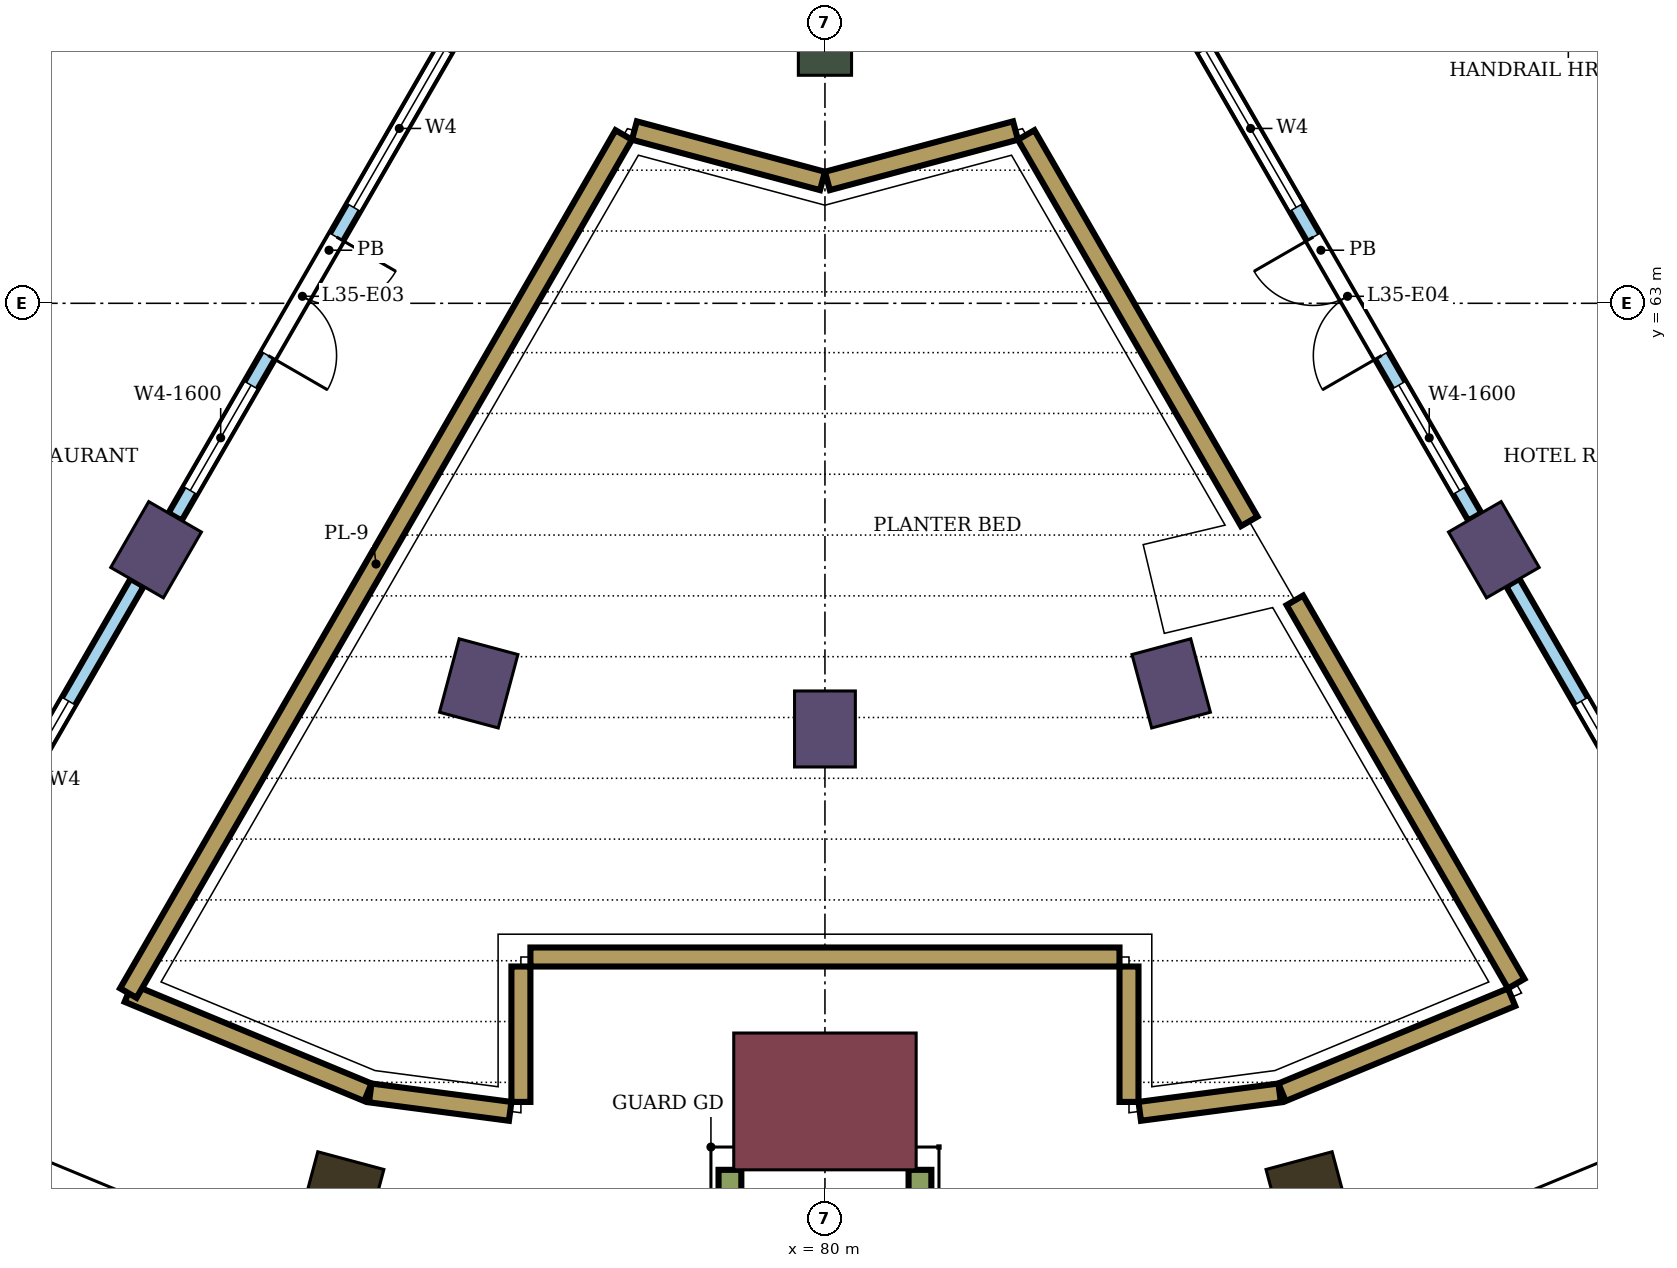
"""IFC4 building model, lengths in metres.
Left out: names, types, materials, properties, quantities, classifications, styles, units other than length and angle.
Written with IfcOpenShell. Run it as: python <this file> out.ifc"""

import sys

from ifc_helpers import new_model, si_unit, direction, frame, frame_2d, origin, origin_2d, place, context, subcontext, project, spatial, rectangle, extrude, element, fill, save


model = new_model("IFC4")
c1 = context("Model", 3, precision=1e-05, world=origin(), true_north=direction((0.0, 1.0)))
c2 = subcontext(c1, "Body", "Model", "MODEL_VIEW")
j1 = project(units=[si_unit("LENGTHUNIT", "METRE"), si_unit("PLANEANGLEUNIT", "RADIAN")], contexts=[c1])
p1 = place(None, origin())
s1 = spatial("IfcSite", under=j1, at=p1, CompositionType="ELEMENT")
p2 = place(p1, origin())
s2 = spatial("IfcBuilding", under=s1, at=p2, CompositionType="ELEMENT")
p3 = place(p2, frame((0.0, 0.0, 149.7)))
s3 = spatial("IfcBuildingStorey", under=s2, at=p3, CompositionType="ELEMENT", Elevation=149.7)
for number, where, z_axis, x_axis in (
    (1, (73.633, 51.238, 0.0), (0.0, 0.0, 1.0), (-0.259, -0.966, 0.0)),
    (2, (86.367, 51.238, 0.0), (0.0, 0.0, 1.0), (0.259, -0.966, 0.0)),
):
    element("IfcColumn", number, at=place(p3, frame(where, z_axis=z_axis, x_axis=x_axis)), inside=s3, PredefinedType="COLUMN", context=c2, shape_type="SweptSolid", body=[
        extrude(rectangle(XDim=1.0, YDim=0.9, at=origin_2d()), origin(), (0.0, 0.0, 1.0), 8.0),
    ])
for number, where, z_axis, x_axis in (
    (3, (71.2, 59.758, 0.0), (0.0, 0.0, 1.0), (-0.5, -0.866, 0.0)),
    (4, (75.445, 58.0, 0.0), (0.0, 0.0, 1.0), (-0.259, -0.966, 0.0)),
    (5, (80.0, 57.4, 0.0), (0.0, 0.0, 1.0), (0.0, -1.0, 0.0)),
    (6, (84.555, 58.0, 0.0), (0.0, 0.0, 1.0), (0.259, -0.966, 0.0)),
    (7, (88.8, 59.758, 0.0), (0.0, 0.0, 1.0), (0.5, -0.866, 0.0)),
):
    element("IfcColumn", number, at=place(p3, frame(where, z_axis=z_axis, x_axis=x_axis)), inside=s3, PredefinedType="COLUMN", context=c2, shape_type="SweptSolid", body=[
        extrude(rectangle(XDim=1.0, YDim=0.8, at=origin_2d()), origin(), (0.0, 0.0, 1.0), 8.0),
    ])
p4 = place(p3, frame((80.0, 66.4, 0.0), z_axis=(0.0, 0.0, 1.0), x_axis=(0.0, -1.0, 0.0)))
e8 = element("IfcColumn", 8, at=p4, inside=s3, PredefinedType="COLUMN", context=c2, shape_type="SweptSolid", body=[
    extrude(rectangle(XDim=0.8, YDim=0.7, at=origin_2d()), origin(), (0.0, 0.0, 1.0), 8.0),
])
p5 = place(p3, frame((80.0, 52.5, 0.0), z_axis=(0.0, 0.0, 1.0), x_axis=(0.0, -1.0, 0.0)))
e9 = element("IfcColumn", 9, at=p5, inside=s3, PredefinedType="COLUMN", context=c2, shape_type="SweptSolid", body=[
    extrude(rectangle(XDim=1.8, YDim=2.4, at=origin_2d()), origin(), (0.0, 0.0, 1.0), 8.0),
])
for number, where, z_axis, x_axis in (
    (10, (78.75, 51.6, 0.0), (0.0, 0.0, 1.0), (0.0, -1.0, 0.0)),
    (11, (81.25, 51.6, 0.0), (0.0, 0.0, 1.0), (0.0, -1.0, 0.0)),
):
    element("IfcWall", number, at=place(p3, frame(where, z_axis=z_axis, x_axis=x_axis)), inside=s3, PredefinedType="NOTDEFINED", context=c2, shape_type="SweptSolid", body=[
        extrude(rectangle(XDim=2.416, YDim=0.3, at=frame_2d((1.208, 0.0))), origin(), (0.0, 0.0, 1.0), 8.0),
    ])
p6 = place(p3, frame((70.835, 53.926, 0.0), z_axis=(0.0, 0.0, 1.0), x_axis=(0.923871147788, -0.38270367425, 0.0)))
e12 = element("IfcWall", 12, at=p6, inside=s3, PredefinedType="USERDEFINED", context=c2, shape_type="SweptSolid", body=[
    extrude(rectangle(XDim=3.411, YDim=0.25, at=frame_2d((1.706, 0.0))), origin(), (0.0, 0.0, 1.0), 0.6),
])
p7 = place(p3, frame((74.018, 52.612, 0.0), z_axis=(0.0, 0.0, 1.0), x_axis=(0.991436829887, -0.130587182926, 0.0)))
e13 = element("IfcWall", 13, at=p7, inside=s3, PredefinedType="USERDEFINED", context=c2, shape_type="SweptSolid", body=[
    extrude(rectangle(XDim=1.856, YDim=0.25, at=frame_2d((0.928, 0.0))), origin(), (0.0, 0.0, 1.0), 0.6),
])
p8 = place(p3, frame((76.0, 52.493, 0.0), z_axis=(0.0, 0.0, 1.0), x_axis=(0.0, 1.0, 0.0)))
e14 = element("IfcWall", 14, at=p8, inside=s3, PredefinedType="USERDEFINED", context=c2, shape_type="SweptSolid", body=[
    extrude(rectangle(XDim=1.781, YDim=0.25, at=frame_2d((0.891, 0.0))), origin(), (0.0, 0.0, 1.0), 0.6),
])
p9 = place(p3, frame((76.125, 54.4, 0.0), z_axis=(0.0, 0.0, 1.0), x_axis=(1.0, 0.0, 0.0)))
e15 = element("IfcWall", 15, at=p9, inside=s3, PredefinedType="USERDEFINED", context=c2, shape_type="SweptSolid", body=[
    extrude(rectangle(XDim=7.75, YDim=0.25, at=frame_2d((3.875, 0.0))), origin(), (0.0, 0.0, 1.0), 0.6),
])
p10 = place(p3, frame((84.0, 54.275, 0.0), z_axis=(0.0, 0.0, 1.0), x_axis=(0.0, -1.0, 0.0)))
e16 = element("IfcWall", 16, at=p10, inside=s3, PredefinedType="USERDEFINED", context=c2, shape_type="SweptSolid", body=[
    extrude(rectangle(XDim=1.781, YDim=0.25, at=frame_2d((0.891, 0.0))), origin(), (0.0, 0.0, 1.0), 0.6),
])
p11 = place(p3, frame((84.141, 52.369, 0.0), z_axis=(0.0, 0.0, 1.0), x_axis=(0.991436829887, 0.130587182926, 0.0)))
e17 = element("IfcWall", 17, at=p11, inside=s3, PredefinedType="USERDEFINED", context=c2, shape_type="SweptSolid", body=[
    extrude(rectangle(XDim=1.856, YDim=0.25, at=frame_2d((0.928, 0.0))), origin(), (0.0, 0.0, 1.0), 0.6),
])
p12 = place(p3, frame((86.014, 52.62, 0.0), z_axis=(0.0, 0.0, 1.0), x_axis=(0.923863886655, 0.382721202621, 0.0)))
e18 = element("IfcWall", 18, at=p12, inside=s3, PredefinedType="USERDEFINED", context=c2, shape_type="SweptSolid", body=[
    extrude(rectangle(XDim=3.269, YDim=0.25, at=frame_2d((1.634, 0.0))), origin(), (0.0, 0.0, 1.0), 0.6),
])
p13 = place(p3, frame((89.094, 54.049, 0.0), z_axis=(0.0, 0.0, 1.0), x_axis=(-0.50000795037, 0.866020813587, 0.0)))
e19 = element("IfcWall", 19, at=p13, inside=s3, PredefinedType="USERDEFINED", context=c2, shape_type="SweptSolid", body=[
    extrude(rectangle(XDim=5.823, YDim=0.25, at=frame_2d((2.912, 0.0))), origin(), (0.0, 0.0, 1.0), 0.6),
])
p14 = place(p3, frame((85.582, 60.131, 0.0), z_axis=(0.0, 0.0, 1.0), x_axis=(-0.499999689456, 0.866025583077, 0.0)))
e20 = element("IfcWall", 20, at=p14, inside=s3, PredefinedType="USERDEFINED", context=c2, shape_type="SweptSolid", body=[
    extrude(rectangle(XDim=5.87, YDim=0.25, at=frame_2d((2.935, 0.0))), origin(), (0.0, 0.0, 1.0), 0.6),
])
for number, where, z_axis, x_axis in (
    (21, (82.507, 65.273, 0.0), (0.0, 0.0, 1.0), (-0.966, -0.259, 0.0)),
    (22, (79.968, 64.61, 0.0), (0.0, 0.0, 1.0), (-0.966, 0.259, 0.0)),
):
    element("IfcWall", number, at=place(p3, frame(where, z_axis=z_axis, x_axis=x_axis)), inside=s3, PredefinedType="USERDEFINED", context=c2, shape_type="SweptSolid", body=[
        extrude(rectangle(XDim=2.562, YDim=0.25, at=frame_2d((1.281, 0.0))), origin(), (0.0, 0.0, 1.0), 0.6),
    ])
p15 = place(p3, frame((77.353, 65.215, 0.0), z_axis=(0.0, 0.0, 1.0), x_axis=(-0.499990498062, -0.866030889661, 0.0)))
e23 = element("IfcWall", 23, at=p15, inside=s3, PredefinedType="USERDEFINED", context=c2, shape_type="SweptSolid", body=[
    extrude(rectangle(XDim=13.035, YDim=0.25, at=frame_2d((6.518, 0.0))), origin(), (0.0, 0.0, 1.0), 0.6),
])
p16 = place(p3, frame((75.5, 67.206, 0.0), z_axis=(0.0, 0.0, 1.0), x_axis=(-0.499999880539, -0.866025472755, 0.0)))
e24 = element("IfcWall", 24, at=p16, inside=s3, PredefinedType="NOTDEFINED", context=c2, shape_type="SweptSolid", body=[
    extrude(rectangle(XDim=8.1, YDim=0.2, at=frame_2d((4.05, 0.0))), origin(), (0.0, 0.0, 1.0), 8.0),
])
p17 = place(p16, frame((1.0, 0.0, 0.3)))
e25 = element("IfcOpeningElement", 25, at=p17, cuts=e24, PredefinedType="OPENING", context=c2, shape_type="SweptSolid", body=[
    extrude(rectangle(XDim=2.4, YDim=3.6, at=frame_2d((1.2, 1.8))), frame((0.0, 0.11, 0.0), z_axis=(0.0, -1.0, 0.0), x_axis=(1.0, 0.0, 0.0)), (0.0, 0.0, 1.0), 0.22),
])
p18 = place(p16, frame((3.85, 0.0, 0.0)))
e26 = element("IfcOpeningElement", 26, at=p18, cuts=e24, PredefinedType="OPENING", context=c2, shape_type="SweptSolid", body=[
    extrude(rectangle(XDim=1.8, YDim=2.4, at=frame_2d((0.9, 1.2))), frame((0.0, 0.11, 0.0), z_axis=(0.0, -1.0, 0.0), x_axis=(1.0, 0.0, 0.0)), (0.0, 0.0, 1.0), 0.22),
])
p19 = place(p16, frame((6.1, 0.0, 0.3)))
e27 = element("IfcOpeningElement", 27, at=p19, cuts=e24, PredefinedType="OPENING", context=c2, shape_type="SweptSolid", body=[
    extrude(rectangle(XDim=1.6, YDim=3.6, at=frame_2d((0.8, 1.8))), frame((0.0, 0.11, 0.0), z_axis=(0.0, -1.0, 0.0), x_axis=(1.0, 0.0, 0.0)), (0.0, 0.0, 1.0), 0.22),
])
p20 = place(p3, frame((70.95, 59.325, 0.0), z_axis=(0.0, 0.0, 1.0), x_axis=(-0.500007758305, -0.866020924479, 0.0)))
e28 = element("IfcWall", 28, at=p20, inside=s3, PredefinedType="NOTDEFINED", context=c2, shape_type="SweptSolid", body=[
    extrude(rectangle(XDim=6.0, YDim=0.2, at=frame_2d((3.0, 0.0))), origin(), (0.0, 0.0, 1.0), 8.0),
])
p21 = place(p20, frame((1.8, 0.0, 0.3)))
e29 = element("IfcOpeningElement", 29, at=p21, cuts=e28, PredefinedType="OPENING", context=c2, shape_type="SweptSolid", body=[
    extrude(rectangle(XDim=2.4, YDim=3.6, at=frame_2d((1.2, 1.8))), frame((0.0, 0.11, 0.0), z_axis=(0.0, -1.0, 0.0), x_axis=(1.0, 0.0, 0.0)), (0.0, 0.0, 1.0), 0.22),
])
p22 = place(p3, frame((84.5, 67.206, 0.0), z_axis=(0.0, 0.0, 1.0), x_axis=(0.499999880539, -0.866025472755, 0.0)))
e30 = element("IfcWall", 30, at=p22, inside=s3, PredefinedType="NOTDEFINED", context=c2, shape_type="SweptSolid", body=[
    extrude(rectangle(XDim=8.1, YDim=0.2, at=frame_2d((4.05, 0.0))), origin(), (0.0, 0.0, 1.0), 8.0),
])
p23 = place(p22, frame((1.0, 0.0, 0.3)))
e31 = element("IfcOpeningElement", 31, at=p23, cuts=e30, PredefinedType="OPENING", context=c2, shape_type="SweptSolid", body=[
    extrude(rectangle(XDim=2.4, YDim=3.6, at=frame_2d((1.2, 1.8))), frame((0.0, 0.11, 0.0), z_axis=(0.0, -1.0, 0.0), x_axis=(1.0, 0.0, 0.0)), (0.0, 0.0, 1.0), 0.22),
])
p24 = place(p22, frame((3.85, 0.0, 0.0)))
e32 = element("IfcOpeningElement", 32, at=p24, cuts=e30, PredefinedType="OPENING", context=c2, shape_type="SweptSolid", body=[
    extrude(rectangle(XDim=1.8, YDim=2.4, at=frame_2d((0.9, 1.2))), frame((0.0, 0.11, 0.0), z_axis=(0.0, -1.0, 0.0), x_axis=(1.0, 0.0, 0.0)), (0.0, 0.0, 1.0), 0.22),
])
p25 = place(p22, frame((6.1, 0.0, 0.3)))
e33 = element("IfcOpeningElement", 33, at=p25, cuts=e30, PredefinedType="OPENING", context=c2, shape_type="SweptSolid", body=[
    extrude(rectangle(XDim=1.6, YDim=3.6, at=frame_2d((0.8, 1.8))), frame((0.0, 0.11, 0.0), z_axis=(0.0, -1.0, 0.0), x_axis=(1.0, 0.0, 0.0)), (0.0, 0.0, 1.0), 0.22),
])
p26 = place(p3, frame((89.05, 59.325, 0.0), z_axis=(0.0, 0.0, 1.0), x_axis=(0.500007758305, -0.866020924479, 0.0)))
e34 = element("IfcWall", 34, at=p26, inside=s3, PredefinedType="NOTDEFINED", context=c2, shape_type="SweptSolid", body=[
    extrude(rectangle(XDim=6.0, YDim=0.2, at=frame_2d((3.0, 0.0))), origin(), (0.0, 0.0, 1.0), 8.0),
])
p27 = place(p26, frame((1.8, 0.0, 0.3)))
e35 = element("IfcOpeningElement", 35, at=p27, cuts=e34, PredefinedType="OPENING", context=c2, shape_type="SweptSolid", body=[
    extrude(rectangle(XDim=2.4, YDim=3.6, at=frame_2d((1.2, 1.8))), frame((0.0, 0.11, 0.0), z_axis=(0.0, -1.0, 0.0), x_axis=(1.0, 0.0, 0.0)), (0.0, 0.0, 1.0), 0.22),
])
p28 = place(p17, origin())
e36 = element("IfcWindow", 36, at=p28, inside=s3, PartitioningType="SINGLE_PANEL", PredefinedType="WINDOW", context=c2, shape_type="SweptSolid", body=[
    extrude(rectangle(XDim=2.4, YDim=3.6, at=frame_2d((1.2, 1.8))), frame((0.0, 0.03, 0.0), z_axis=(0.0, -1.0, 0.0), x_axis=(1.0, 0.0, 0.0)), (0.0, 0.0, 1.0), 0.06),
])
fill(e25, e36)
p29 = place(p18, origin())
e37 = element("IfcDoor", 37, at=p29, inside=s3, OperationType="DOUBLE_DOOR_SINGLE_SWING", PredefinedType="DOOR", context=c2, shape_type="SweptSolid", body=[
    extrude(rectangle(XDim=1.8, YDim=2.4, at=frame_2d((0.9, 1.2))), frame((0.0, 0.025, 0.0), z_axis=(0.0, -1.0, 0.0), x_axis=(1.0, 0.0, 0.0)), (0.0, 0.0, 1.0), 0.05),
])
fill(e26, e37)
p30 = place(p19, origin())
e38 = element("IfcWindow", 38, at=p30, inside=s3, PartitioningType="SINGLE_PANEL", PredefinedType="WINDOW", context=c2, shape_type="SweptSolid", body=[
    extrude(rectangle(XDim=1.6, YDim=3.6, at=frame_2d((0.8, 1.8))), frame((0.0, 0.03, 0.0), z_axis=(0.0, -1.0, 0.0), x_axis=(1.0, 0.0, 0.0)), (0.0, 0.0, 1.0), 0.06),
])
fill(e27, e38)
p31 = place(p21, origin())
e39 = element("IfcWindow", 39, at=p31, inside=s3, PartitioningType="SINGLE_PANEL", PredefinedType="WINDOW", context=c2, shape_type="SweptSolid", body=[
    extrude(rectangle(XDim=2.4, YDim=3.6, at=frame_2d((1.2, 1.8))), frame((0.0, 0.03, 0.0), z_axis=(0.0, -1.0, 0.0), x_axis=(1.0, 0.0, 0.0)), (0.0, 0.0, 1.0), 0.06),
])
fill(e29, e39)
p32 = place(p23, origin())
e40 = element("IfcWindow", 40, at=p32, inside=s3, PartitioningType="SINGLE_PANEL", PredefinedType="WINDOW", context=c2, shape_type="SweptSolid", body=[
    extrude(rectangle(XDim=2.4, YDim=3.6, at=frame_2d((1.2, 1.8))), frame((0.0, 0.03, 0.0), z_axis=(0.0, -1.0, 0.0), x_axis=(1.0, 0.0, 0.0)), (0.0, 0.0, 1.0), 0.06),
])
fill(e31, e40)
p33 = place(p24, frame((1.8, 0.0, 0.0), z_axis=(0.0, 0.0, 1.0), x_axis=(-1.0, 0.0, 0.0)))
e41 = element("IfcDoor", 41, at=p33, inside=s3, OperationType="DOUBLE_DOOR_SINGLE_SWING", PredefinedType="DOOR", context=c2, shape_type="SweptSolid", body=[
    extrude(rectangle(XDim=1.8, YDim=2.4, at=frame_2d((0.9, 1.2))), frame((0.0, 0.025, 0.0), z_axis=(0.0, -1.0, 0.0), x_axis=(1.0, 0.0, 0.0)), (0.0, 0.0, 1.0), 0.05),
])
fill(e32, e41)
p34 = place(p25, origin())
e42 = element("IfcWindow", 42, at=p34, inside=s3, PartitioningType="SINGLE_PANEL", PredefinedType="WINDOW", context=c2, shape_type="SweptSolid", body=[
    extrude(rectangle(XDim=1.6, YDim=3.6, at=frame_2d((0.8, 1.8))), frame((0.0, 0.03, 0.0), z_axis=(0.0, -1.0, 0.0), x_axis=(1.0, 0.0, 0.0)), (0.0, 0.0, 1.0), 0.06),
])
fill(e33, e42)
p35 = place(p27, origin())
e43 = element("IfcWindow", 43, at=p35, inside=s3, PartitioningType="SINGLE_PANEL", PredefinedType="WINDOW", context=c2, shape_type="SweptSolid", body=[
    extrude(rectangle(XDim=2.4, YDim=3.6, at=frame_2d((1.2, 1.8))), frame((0.0, 0.03, 0.0), z_axis=(0.0, -1.0, 0.0), x_axis=(1.0, 0.0, 0.0)), (0.0, 0.0, 1.0), 0.06),
])
fill(e35, e43)
save(model, sys.argv[1])
